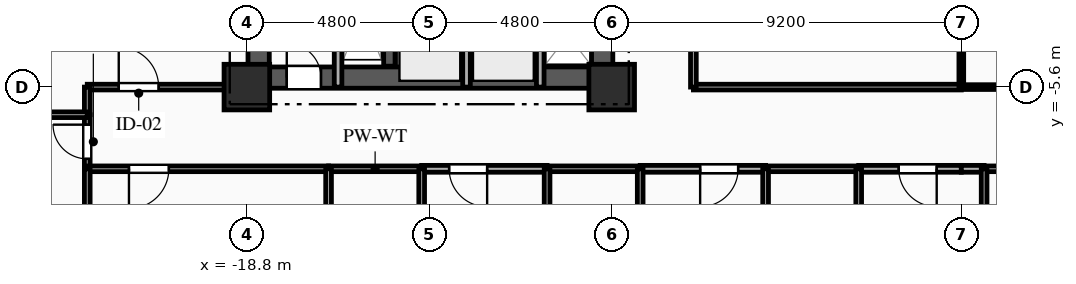
"""IFC4 building model, lengths in metres.
Left out: names, types, materials, properties, quantities, classifications, styles, units other than length and angle.
Written with IfcOpenShell. Run it as: python <this file> out.ifc"""

import sys

from ifc_helpers import new_model, si_unit, direction, frame, frame_2d, origin, origin_2d, place, context, subcontext, project, spatial, rectangle, extrude, element, fill, save


model = new_model("IFC4")
c1 = context("Model", 3, precision=1e-05, world=origin(), true_north=direction((0.0, 1.0)))
c2 = subcontext(c1, "Body", "Model", "MODEL_VIEW")
j1 = project(units=[si_unit("LENGTHUNIT", "METRE"), si_unit("PLANEANGLEUNIT", "RADIAN")], contexts=[c1])
p1 = place(None, origin())
s1 = spatial("IfcSite", under=j1, at=p1, CompositionType="ELEMENT")
p2 = place(p1, origin())
s2 = spatial("IfcBuilding", under=s1, at=p2, CompositionType="ELEMENT")
p3 = place(p2, frame((0.0, 0.0, 67.2)))
s3 = spatial("IfcBuildingStorey", under=s2, at=p3, CompositionType="ELEMENT", Elevation=67.2)
for number, where, z_axis, x_axis in (
    (1, (-18.8, -5.6, 0.0), (0.0, 0.0, 1.0), (1.0, 0.0, 0.0)),
    (2, (-9.2, -5.6, 0.0), (0.0, 0.0, 1.0), (1.0, 0.0, 0.0)),
):
    element("IfcColumn", number, at=place(p3, frame(where, z_axis=z_axis, x_axis=x_axis)), inside=s3, PredefinedType="COLUMN", context=c2, shape_type="SweptSolid", body=[
        extrude(rectangle(XDim=1.2, YDim=1.2, at=origin_2d()), origin(), (0.0, 0.0, 1.0), 3.35),
    ])
p4 = place(p3, frame((-18.8, -5.35, 0.0), z_axis=(0.0, 0.0, 1.0), x_axis=(1.0, 0.0, 0.0)))
e3 = element("IfcWall", 3, at=p4, inside=s3, PredefinedType="SHEAR", context=c2, shape_type="SweptSolid", body=[
    extrude(rectangle(XDim=9.6, YDim=0.56, at=frame_2d((4.8, 0.0))), origin(), (0.0, 0.0, 1.0), 3.035),
])
p5 = place(p4, frame((1.05, 0.0, 0.0)))
e4 = element("IfcOpeningElement", 4, at=p5, cuts=e3, PredefinedType="OPENING", context=c2, shape_type="SweptSolid", body=[
    extrude(rectangle(XDim=0.9, YDim=2.1, at=frame_2d((0.45, 1.05))), frame((0.0, 0.29, 0.0), z_axis=(0.0, -1.0, 0.0), x_axis=(1.0, 0.0, 0.0)), (0.0, 0.0, 1.0), 0.58),
])
p6 = place(p3, frame((-18.49, -5.05, 0.0), z_axis=(0.0, 0.0, 1.0), x_axis=(0.0, 1.0, 0.0)))
e5 = element("IfcWall", 5, at=p6, inside=s3, PredefinedType="SHEAR", context=c2, shape_type="SweptSolid", body=[
    extrude(rectangle(XDim=10.1, YDim=0.56, at=frame_2d((5.05, 0.0))), origin(), (0.0, 0.0, 1.0), 3.035),
])
p7 = place(p3, frame((-9.45, -5.05, 0.0), z_axis=(0.0, 0.0, 1.0), x_axis=(0.0, 1.0, 0.0)))
e6 = element("IfcWall", 6, at=p7, inside=s3, PredefinedType="SHEAR", context=c2, shape_type="SweptSolid", body=[
    extrude(rectangle(XDim=10.1, YDim=0.56, at=frame_2d((5.05, 0.0))), origin(), (0.0, 0.0, 1.0), 3.035),
])
p8 = place(p7, frame((7.15, 0.0, 0.0)))
e7 = element("IfcOpeningElement", 7, at=p8, cuts=e6, PredefinedType="OPENING", context=c2, shape_type="SweptSolid", body=[
    extrude(rectangle(XDim=0.9, YDim=2.1, at=frame_2d((0.45, 1.05))), frame((0.0, 0.29, 0.0), z_axis=(0.0, -1.0, 0.0), x_axis=(1.0, 0.0, 0.0)), (0.0, 0.0, 1.0), 0.58),
])
p9 = place(p7, frame((2.4, 0.0, 0.0)))
e8 = element("IfcOpeningElement", 8, at=p9, cuts=e6, PredefinedType="OPENING", context=c2, shape_type="SweptSolid", body=[
    extrude(rectangle(XDim=1.2, YDim=2.15, at=frame_2d((0.6, 1.075))), frame((0.0, 0.29, 0.0), z_axis=(0.0, -1.0, 0.0), x_axis=(1.0, 0.0, 0.0)), (0.0, 0.0, 1.0), 0.58),
])
p10 = place(p3, frame((-15.05, -5.05, 0.0), z_axis=(0.0, 0.0, 1.0), x_axis=(0.0, 1.0, 0.0)))
e9 = element("IfcWall", 9, at=p10, inside=s3, PredefinedType="SHEAR", context=c2, shape_type="SweptSolid", body=[
    extrude(rectangle(XDim=10.1, YDim=0.3, at=frame_2d((5.05, 0.0))), origin(), (0.0, 0.0, 1.0), 3.035),
])
p11 = place(p3, frame((-16.4, -5.6, 0.0), z_axis=(0.0, 0.0, 1.0), x_axis=(0.0, 1.0, 0.0)))
e10 = element("IfcWall", 10, at=p11, inside=s3, PredefinedType="PARTITIONING", context=c2, shape_type="SweptSolid", body=[
    extrude(rectangle(XDim=3.49, YDim=0.2, at=frame_2d((1.745, 0.0))), origin(), (0.0, 0.0, 1.0), 3.035),
])
for number, where, z_axis, x_axis in (
    (11, (-13.02, -5.6, 0.0), (0.0, 0.0, 1.0), (0.0, 1.0, 0.0)),
    (12, (-11.08, -5.6, 0.0), (0.0, 0.0, 1.0), (0.0, 1.0, 0.0)),
):
    element("IfcWall", number, at=place(p3, frame(where, z_axis=z_axis, x_axis=x_axis)), inside=s3, PredefinedType="PARTITIONING", context=c2, shape_type="SweptSolid", body=[
        extrude(rectangle(XDim=2.25, YDim=0.2, at=frame_2d((1.125, 0.0))), origin(), (0.0, 0.0, 1.0), 3.035),
    ])
p12 = place(p3, frame((-23.0, -7.75, 0.0), z_axis=(0.0, 0.0, 1.0), x_axis=(0.0, 1.0, 0.0)))
e13 = element("IfcWall", 13, at=p12, inside=s3, PredefinedType="PARTITIONING", context=c2, shape_type="SweptSolid", body=[
    extrude(rectangle(XDim=1.423, YDim=0.15, at=frame_2d((0.711, 0.0))), origin(), (0.0, 0.0, 1.0), 3.035),
])
p13 = place(p12, frame((0.261, 0.0, 0.0)))
e14 = element("IfcOpeningElement", 14, at=p13, cuts=e13, PredefinedType="OPENING", context=c2, shape_type="SweptSolid", body=[
    extrude(rectangle(XDim=0.9, YDim=2.1, at=frame_2d((0.45, 1.05))), frame((0.0, 0.085, 0.0), z_axis=(0.0, -1.0, 0.0), x_axis=(1.0, 0.0, 0.0)), (0.0, 0.0, 1.0), 0.17),
])
p14 = place(p3, frame((-23.0, -5.6, 0.0), z_axis=(0.0, 0.0, 1.0), x_axis=(1.0, 0.0, 0.0)))
e15 = element("IfcWall", 15, at=p14, inside=s3, PredefinedType="PARTITIONING", context=c2, shape_type="SweptSolid", body=[
    extrude(rectangle(XDim=4.2, YDim=0.15, at=frame_2d((2.1, 0.0))), origin(), (0.0, 0.0, 1.0), 3.035),
])
p15 = place(p14, frame((0.829, 0.0, 0.0)))
e16 = element("IfcOpeningElement", 16, at=p15, cuts=e15, PredefinedType="OPENING", context=c2, shape_type="SweptSolid", body=[
    extrude(rectangle(XDim=1.05, YDim=2.15, at=frame_2d((0.525, 1.075))), frame((0.0, 0.085, 0.0), z_axis=(0.0, -1.0, 0.0), x_axis=(1.0, 0.0, 0.0)), (0.0, 0.0, 1.0), 0.17),
])
p16 = place(p3, frame((-23.0, -6.327, 0.0), z_axis=(0.0, 0.0, 1.0), x_axis=(0.0, 1.0, 0.0)))
e17 = element("IfcWall", 17, at=p16, inside=s3, PredefinedType="PARTITIONING", context=c2, shape_type="SweptSolid", body=[
    extrude(rectangle(XDim=0.727, YDim=0.15, at=frame_2d((0.363, 0.0))), origin(), (0.0, 0.0, 1.0), 3.035),
])
p17 = place(p3, frame((-16.65, -7.75, 0.0), z_axis=(0.0, 0.0, 1.0), x_axis=(-1.0, 0.0, 0.0)))
e18 = element("IfcWall", 18, at=p17, inside=s3, PredefinedType="PARTITIONING", context=c2, shape_type="SweptSolid", body=[
    extrude(rectangle(XDim=6.35, YDim=0.15, at=frame_2d((3.175, 0.0))), origin(), (0.0, 0.0, 1.0), 3.035),
])
p18 = place(p17, frame((4.202, 0.0, 0.0)))
e19 = element("IfcOpeningElement", 19, at=p18, cuts=e18, PredefinedType="OPENING", context=c2, shape_type="SweptSolid", body=[
    extrude(rectangle(XDim=1.05, YDim=2.15, at=frame_2d((0.525, 1.075))), frame((0.0, 0.085, 0.0), z_axis=(0.0, -1.0, 0.0), x_axis=(1.0, 0.0, 0.0)), (0.0, 0.0, 1.0), 0.17),
])
p19 = place(p3, frame((-10.9, -7.75, 0.0), z_axis=(0.0, 0.0, 1.0), x_axis=(-1.0, 0.0, 0.0)))
e20 = element("IfcWall", 20, at=p19, inside=s3, PredefinedType="PARTITIONING", context=c2, shape_type="SweptSolid", body=[
    extrude(rectangle(XDim=3.3, YDim=0.18, at=frame_2d((1.65, 0.0))), origin(), (0.0, 0.0, 1.0), 3.035),
])
p20 = place(p19, frame((1.577, 0.0, 0.0)))
e21 = element("IfcOpeningElement", 21, at=p20, cuts=e20, PredefinedType="OPENING", context=c2, shape_type="SweptSolid", body=[
    extrude(rectangle(XDim=1.0, YDim=2.15, at=frame_2d((0.5, 1.075))), frame((0.0, 0.1, 0.0), z_axis=(0.0, -1.0, 0.0), x_axis=(1.0, 0.0, 0.0)), (0.0, 0.0, 1.0), 0.2),
])
p21 = place(p3, frame((-14.2, -7.75, 0.0), z_axis=(0.0, 0.0, 1.0), x_axis=(-1.0, 0.0, 0.0)))
e22 = element("IfcWall", 22, at=p21, inside=s3, PredefinedType="PLUMBINGWALL", context=c2, shape_type="SweptSolid", body=[
    extrude(rectangle(XDim=2.45, YDim=0.15, at=frame_2d((1.225, 0.0))), origin(), (0.0, 0.0, 1.0), 3.035),
])
p22 = place(p3, frame((-5.15, -7.75, 0.0), z_axis=(0.0, 0.0, 1.0), x_axis=(-1.0, 0.0, 0.0)))
e23 = element("IfcWall", 23, at=p22, inside=s3, PredefinedType="PARTITIONING", context=c2, shape_type="SweptSolid", body=[
    extrude(rectangle(XDim=3.3, YDim=0.18, at=frame_2d((1.65, 0.0))), origin(), (0.0, 0.0, 1.0), 3.035),
])
p23 = place(p22, frame((0.722, 0.0, 0.0)))
e24 = element("IfcOpeningElement", 24, at=p23, cuts=e23, PredefinedType="OPENING", context=c2, shape_type="SweptSolid", body=[
    extrude(rectangle(XDim=1.0, YDim=2.15, at=frame_2d((0.5, 1.075))), frame((0.0, 0.1, 0.0), z_axis=(0.0, -1.0, 0.0), x_axis=(1.0, 0.0, 0.0)), (0.0, 0.0, 1.0), 0.2),
])
p24 = place(p3, frame((-8.45, -7.75, 0.0), z_axis=(0.0, 0.0, 1.0), x_axis=(-1.0, 0.0, 0.0)))
e25 = element("IfcWall", 25, at=p24, inside=s3, PredefinedType="PLUMBINGWALL", context=c2, shape_type="SweptSolid", body=[
    extrude(rectangle(XDim=2.45, YDim=0.15, at=frame_2d((1.225, 0.0))), origin(), (0.0, 0.0, 1.0), 3.035),
])
p25 = place(p3, frame((0.0, -7.75, 0.0), z_axis=(0.0, 0.0, 1.0), x_axis=(-1.0, 0.0, 0.0)))
e26 = element("IfcWall", 26, at=p25, inside=s3, PredefinedType="PARTITIONING", context=c2, shape_type="SweptSolid", body=[
    extrude(rectangle(XDim=2.7, YDim=0.18, at=frame_2d((1.35, 0.0))), origin(), (0.0, 0.0, 1.0), 3.035),
])
p26 = place(p25, frame((0.647, 0.0, 0.0)))
e27 = element("IfcOpeningElement", 27, at=p26, cuts=e26, PredefinedType="OPENING", context=c2, shape_type="SweptSolid", body=[
    extrude(rectangle(XDim=1.0, YDim=2.15, at=frame_2d((0.5, 1.075))), frame((0.0, 0.1, 0.0), z_axis=(0.0, -1.0, 0.0), x_axis=(1.0, 0.0, 0.0)), (0.0, 0.0, 1.0), 0.2),
])
p27 = place(p3, frame((-2.7, -7.75, 0.0), z_axis=(0.0, 0.0, 1.0), x_axis=(-1.0, 0.0, 0.0)))
e28 = element("IfcWall", 28, at=p27, inside=s3, PredefinedType="PLUMBINGWALL", context=c2, shape_type="SweptSolid", body=[
    extrude(rectangle(XDim=2.45, YDim=0.15, at=frame_2d((1.225, 0.0))), origin(), (0.0, 0.0, 1.0), 3.035),
])
p28 = place(p3, frame((-7.05, -5.6, 0.0), z_axis=(0.0, 0.0, 1.0), x_axis=(1.0, 0.0, 0.0)))
e29 = element("IfcWall", 29, at=p28, inside=s3, PredefinedType="PARTITIONING", context=c2, shape_type="SweptSolid", body=[
    extrude(rectangle(XDim=7.05, YDim=0.15, at=frame_2d((3.525, 0.0))), origin(), (0.0, 0.0, 1.0), 2.52),
])
p29 = place(p3, frame((0.6, -7.75, 0.0), z_axis=(0.0, 0.0, 1.0), x_axis=(-1.0, 0.0, 0.0)))
e30 = element("IfcWall", 30, at=p29, inside=s3, PredefinedType="PARTITIONING", context=c2, shape_type="SweptSolid", body=[
    extrude(rectangle(XDim=0.6, YDim=0.18, at=frame_2d((0.3, 0.0))), origin(), (0.0, 0.0, 1.0), 3.035),
])
p30 = place(p3, frame((3.05, -7.75, 0.0), z_axis=(0.0, 0.0, 1.0), x_axis=(-1.0, 0.0, 0.0)))
e31 = element("IfcWall", 31, at=p30, inside=s3, PredefinedType="PLUMBINGWALL", context=c2, shape_type="SweptSolid", body=[
    extrude(rectangle(XDim=2.45, YDim=0.15, at=frame_2d((1.225, 0.0))), origin(), (0.0, 0.0, 1.0), 3.035),
])
p31 = place(p3, frame((0.0, -5.6, 0.0), z_axis=(0.0, 0.0, 1.0), x_axis=(1.0, 0.0, 0.0)))
e32 = element("IfcWall", 32, at=p31, inside=s3, PredefinedType="PARTITIONING", context=c2, shape_type="SweptSolid", body=[
    extrude(rectangle(XDim=7.05, YDim=0.125, at=frame_2d((3.525, 0.0))), origin(), (0.0, 0.0, 1.0), 2.52),
])
p32 = place(p3, frame((-7.05, 8.5, 0.0), z_axis=(0.0, 0.0, 1.0), x_axis=(0.0, -1.0, 0.0)))
e33 = element("IfcWall", 33, at=p32, inside=s3, PredefinedType="PARTITIONING", context=c2, shape_type="SweptSolid", body=[
    extrude(rectangle(XDim=14.1, YDim=0.15, at=frame_2d((7.05, 0.0))), origin(), (0.0, 0.0, 1.0), 3.035),
])
p33 = place(p32, frame((8.074, 0.0, 0.0)))
e34 = element("IfcOpeningElement", 34, at=p33, cuts=e33, PredefinedType="OPENING", context=c2, shape_type="SweptSolid", body=[
    extrude(rectangle(XDim=0.95, YDim=2.1, at=frame_2d((0.475, 1.05))), frame((0.0, 0.085, 0.0), z_axis=(0.0, -1.0, 0.0), x_axis=(1.0, 0.0, 0.0)), (0.0, 0.0, 1.0), 0.17),
])
p34 = place(p3, frame((-25.59, -6.327, 0.0), z_axis=(0.0, 0.0, 1.0), x_axis=(1.0, 0.0, 0.0)))
e35 = element("IfcWall", 35, at=p34, inside=s3, PredefinedType="PARTITIONING", context=c2, shape_type="SweptSolid", body=[
    extrude(rectangle(XDim=2.59, YDim=0.15, at=frame_2d((1.295, 0.0))), origin(), (0.0, 0.0, 1.0), 3.035),
])
p35 = place(p3, frame((-23.0, -7.75, 0.0), z_axis=(0.0, 0.0, 1.0), x_axis=(0.0, -1.0, 0.0)))
e36 = element("IfcWall", 36, at=p35, inside=s3, PredefinedType="PARTITIONING", context=c2, shape_type="SweptSolid", body=[
    extrude(rectangle(XDim=11.65, YDim=0.15, at=frame_2d((5.825, 0.0))), origin(), (0.0, 0.0, 1.0), 3.035),
])
for number, where, z_axis, x_axis in (
    (37, (-16.65, -7.75, 0.0), (0.0, 0.0, 1.0), (0.0, -1.0, 0.0)),
    (38, (-14.2, -9.9, 0.0), (0.0, 0.0, 1.0), (0.0, 1.0, 0.0)),
    (39, (-10.9, -7.75, 0.0), (0.0, 0.0, 1.0), (0.0, -1.0, 0.0)),
    (40, (-8.45, -9.9, 0.0), (0.0, 0.0, 1.0), (0.0, 1.0, 0.0)),
    (41, (-5.15, -7.75, 0.0), (0.0, 0.0, 1.0), (0.0, -1.0, 0.0)),
    (42, (-2.7, -9.9, 0.0), (0.0, 0.0, 1.0), (0.0, 1.0, 0.0)),
    (43, (0.6, -7.75, 0.0), (0.0, 0.0, 1.0), (0.0, -1.0, 0.0)),
):
    element("IfcWall", number, at=place(p3, frame(where, z_axis=z_axis, x_axis=x_axis)), inside=s3, PredefinedType="PLUMBINGWALL", context=c2, shape_type="SweptSolid", body=[
        extrude(rectangle(XDim=2.15, YDim=0.15, at=frame_2d((1.075, 0.0))), origin(), (0.0, 0.0, 1.0), 3.035),
    ])
p36 = place(p3, frame((0.0, 8.5, 0.0), z_axis=(0.0, 0.0, 1.0), x_axis=(0.0, -1.0, 0.0)))
e44 = element("IfcWall", 44, at=p36, inside=s3, PredefinedType="PARTITIONING", context=c2, shape_type="SweptSolid", body=[
    extrude(rectangle(XDim=14.1, YDim=0.125, at=frame_2d((7.05, 0.0))), origin(), (0.0, 0.0, 1.0), 3.035),
])
p37 = place(p5, origin())
e45 = element("IfcDoor", 45, at=p37, inside=s3, OperationType="SINGLE_SWING_LEFT", PredefinedType="DOOR", context=c2, shape_type="SweptSolid", body=[
    extrude(rectangle(XDim=0.9, YDim=2.1, at=frame_2d((0.45, 1.05))), frame((0.0, 0.025, 0.0), z_axis=(0.0, -1.0, 0.0), x_axis=(1.0, 0.0, 0.0)), (0.0, 0.0, 1.0), 0.05),
])
fill(e4, e45)
p38 = place(p13, origin())
e46 = element("IfcDoor", 46, at=p38, inside=s3, OperationType="SINGLE_SWING_RIGHT", PredefinedType="DOOR", context=c2, shape_type="SweptSolid", body=[
    extrude(rectangle(XDim=0.9, YDim=2.1, at=frame_2d((0.45, 1.05))), frame((0.0, 0.025, 0.0), z_axis=(0.0, -1.0, 0.0), x_axis=(1.0, 0.0, 0.0)), (0.0, 0.0, 1.0), 0.05),
])
fill(e14, e46)
p39 = place(p15, origin())
e47 = element("IfcDoor", 47, at=p39, inside=s3, OperationType="SINGLE_SWING_LEFT", PredefinedType="DOOR", context=c2, shape_type="SweptSolid", body=[
    extrude(rectangle(XDim=1.05, YDim=2.15, at=frame_2d((0.525, 1.075))), frame((0.0, 0.025, 0.0), z_axis=(0.0, -1.0, 0.0), x_axis=(1.0, 0.0, 0.0)), (0.0, 0.0, 1.0), 0.05),
])
fill(e16, e47)
p40 = place(p18, origin())
e48 = element("IfcDoor", 48, at=p40, inside=s3, OperationType="SINGLE_SWING_RIGHT", PredefinedType="DOOR", context=c2, shape_type="SweptSolid", body=[
    extrude(rectangle(XDim=1.05, YDim=2.15, at=frame_2d((0.525, 1.075))), frame((0.0, 0.025, 0.0), z_axis=(0.0, -1.0, 0.0), x_axis=(1.0, 0.0, 0.0)), (0.0, 0.0, 1.0), 0.05),
])
fill(e19, e48)
p41 = place(p20, origin())
e49 = element("IfcDoor", 49, at=p41, inside=s3, OperationType="SINGLE_SWING_LEFT", PredefinedType="DOOR", context=c2, shape_type="SweptSolid", body=[
    extrude(rectangle(XDim=1.0, YDim=2.15, at=frame_2d((0.5, 1.075))), frame((0.0, 0.025, 0.0), z_axis=(0.0, -1.0, 0.0), x_axis=(1.0, 0.0, 0.0)), (0.0, 0.0, 1.0), 0.05),
])
fill(e21, e49)
p42 = place(p23, origin())
e50 = element("IfcDoor", 50, at=p42, inside=s3, OperationType="SINGLE_SWING_RIGHT", PredefinedType="DOOR", context=c2, shape_type="SweptSolid", body=[
    extrude(rectangle(XDim=1.0, YDim=2.15, at=frame_2d((0.5, 1.075))), frame((0.0, 0.025, 0.0), z_axis=(0.0, -1.0, 0.0), x_axis=(1.0, 0.0, 0.0)), (0.0, 0.0, 1.0), 0.05),
])
fill(e24, e50)
p43 = place(p26, origin())
e51 = element("IfcDoor", 51, at=p43, inside=s3, OperationType="SINGLE_SWING_LEFT", PredefinedType="DOOR", context=c2, shape_type="SweptSolid", body=[
    extrude(rectangle(XDim=1.0, YDim=2.15, at=frame_2d((0.5, 1.075))), frame((0.0, 0.025, 0.0), z_axis=(0.0, -1.0, 0.0), x_axis=(1.0, 0.0, 0.0)), (0.0, 0.0, 1.0), 0.05),
])
fill(e27, e51)
save(model, sys.argv[1])
